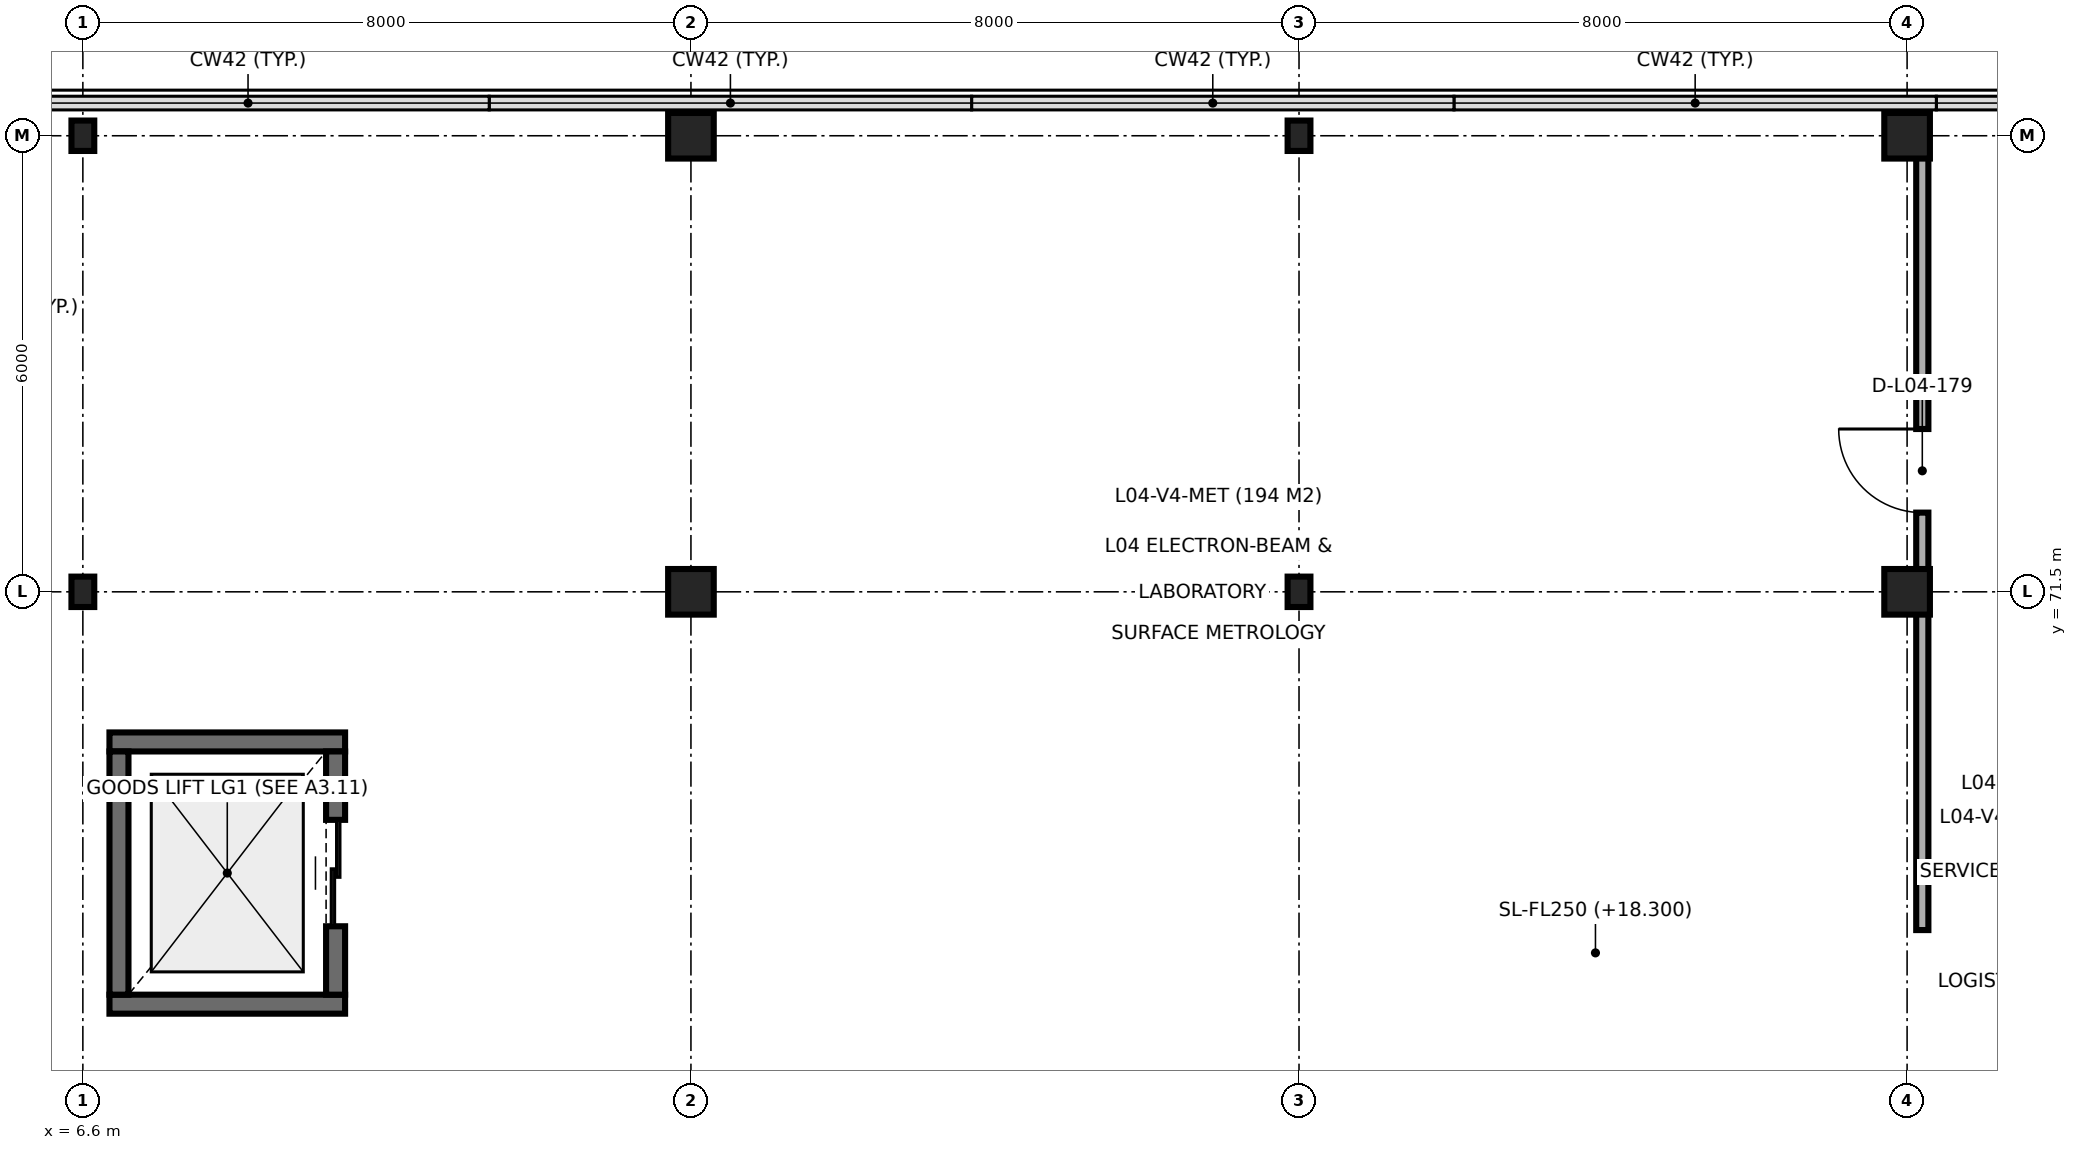
"""IFC4 building model, lengths in metres.
Left out: names, types, materials, properties, quantities, classifications, styles, units other than length and angle.
Written with IfcOpenShell. Run it as: python <this file> out.ifc"""

import sys

from ifc_helpers import new_model, si_unit, direction, frame, frame_2d, origin, origin_2d, place, context, subcontext, project, spatial, rectangle, i_section, extrude, element, fill, save


model = new_model("IFC4")
c1 = context("Model", 3, precision=1e-05, world=origin(), true_north=direction((0.0, 1.0)))
c2 = subcontext(c1, "Body", "Model", "MODEL_VIEW")
j1 = project(units=[si_unit("LENGTHUNIT", "METRE"), si_unit("PLANEANGLEUNIT", "RADIAN")], contexts=[c1])
p1 = place(None, origin())
s1 = spatial("IfcSite", under=j1, at=p1, CompositionType="ELEMENT")
p2 = place(p1, origin())
s2 = spatial("IfcBuilding", under=s1, at=p2, CompositionType="ELEMENT")
p3 = place(p2, frame((0.0, 0.0, 18.3)))
s3 = spatial("IfcBuildingStorey", under=s2, at=p3, CompositionType="ELEMENT", Elevation=18.3)
for number, where, z_axis, x_axis in (
    (1, (6.6, 71.5, 0.0), (0.0, 0.0, 1.0), (1.0, 0.0, 0.0)),
    (2, (6.6, 77.5, 0.0), (0.0, 0.0, 1.0), (1.0, 0.0, 0.0)),
):
    element("IfcColumn", number, at=place(p3, frame(where, z_axis=z_axis, x_axis=x_axis)), inside=s3, PredefinedType="COLUMN", context=c2, shape_type="SweptSolid", body=[
        extrude(i_section(OverallWidth=0.3, OverallDepth=0.4, WebThickness=0.013, FlangeThickness=0.024, FilletRadius=0.027, at=origin_2d()), origin(), (0.0, 0.0, 1.0), 4.5),
    ])
for number, where, z_axis, x_axis in (
    (3, (14.6, 71.5, 0.0), (0.0, 0.0, 1.0), (1.0, 0.0, 0.0)),
    (4, (14.6, 77.5, 0.0), (0.0, 0.0, 1.0), (1.0, 0.0, 0.0)),
):
    element("IfcColumn", number, at=place(p3, frame(where, z_axis=z_axis, x_axis=x_axis)), inside=s3, PredefinedType="COLUMN", context=c2, shape_type="SweptSolid", body=[
        extrude(rectangle(XDim=0.6, YDim=0.6, at=origin_2d()), origin(), (0.0, 0.0, 1.0), 4.5),
    ])
for number, where, z_axis, x_axis in (
    (5, (22.6, 71.5, 0.0), (0.0, 0.0, 1.0), (1.0, 0.0, 0.0)),
    (6, (22.6, 77.5, 0.0), (0.0, 0.0, 1.0), (1.0, 0.0, 0.0)),
):
    element("IfcColumn", number, at=place(p3, frame(where, z_axis=z_axis, x_axis=x_axis)), inside=s3, PredefinedType="COLUMN", context=c2, shape_type="SweptSolid", body=[
        extrude(i_section(OverallWidth=0.3, OverallDepth=0.4, WebThickness=0.013, FlangeThickness=0.024, FilletRadius=0.027, at=origin_2d()), origin(), (0.0, 0.0, 1.0), 4.5),
    ])
for number, where, z_axis, x_axis in (
    (7, (30.6, 71.5, 0.0), (0.0, 0.0, 1.0), (1.0, 0.0, 0.0)),
    (8, (30.6, 77.5, 0.0), (0.0, 0.0, 1.0), (1.0, 0.0, 0.0)),
):
    element("IfcColumn", number, at=place(p3, frame(where, z_axis=z_axis, x_axis=x_axis)), inside=s3, PredefinedType="COLUMN", context=c2, shape_type="SweptSolid", body=[
        extrude(rectangle(XDim=0.6, YDim=0.6, at=origin_2d()), origin(), (0.0, 0.0, 1.0), 4.5),
    ])
for number, where, z_axis, x_axis in (
    (9, (6.95, 66.075, 0.0), (0.0, 0.0, 1.0), (1.0, 0.0, 0.0)),
    (10, (10.05, 69.525, 0.0), (0.0, 0.0, 1.0), (-1.0, 0.0, 0.0)),
):
    element("IfcWall", number, at=place(p3, frame(where, z_axis=z_axis, x_axis=x_axis)), inside=s3, PredefinedType="SHEAR", context=c2, shape_type="SweptSolid", body=[
        extrude(rectangle(XDim=3.1, YDim=0.25, at=frame_2d((1.55, 0.0))), origin(), (0.0, 0.0, 1.0), 4.5),
    ])
p4 = place(p3, frame((7.075, 69.4, 0.0), z_axis=(0.0, 0.0, 1.0), x_axis=(0.0, -1.0, 0.0)))
e11 = element("IfcWall", 11, at=p4, inside=s3, PredefinedType="SHEAR", context=c2, shape_type="SweptSolid", body=[
    extrude(rectangle(XDim=3.2, YDim=0.25, at=frame_2d((1.6, 0.0))), origin(), (0.0, 0.0, 1.0), 4.5),
])
p5 = place(p3, frame((9.925, 66.2, 0.0), z_axis=(0.0, 0.0, 1.0), x_axis=(0.0, 1.0, 0.0)))
e12 = element("IfcWall", 12, at=p5, inside=s3, PredefinedType="SHEAR", context=c2, shape_type="SweptSolid", body=[
    extrude(rectangle(XDim=3.2, YDim=0.25, at=frame_2d((1.6, 0.0))), origin(), (0.0, 0.0, 1.0), 4.5),
])
p6 = place(p5, frame((0.9, 0.0, 0.0)))
e13 = element("IfcOpeningElement", 13, at=p6, cuts=e12, PredefinedType="OPENING", context=c2, shape_type="SweptSolid", body=[
    extrude(rectangle(XDim=1.4, YDim=2.2, at=frame_2d((0.7, 1.1))), frame((0.0, 0.135, 0.0), z_axis=(0.0, -1.0, 0.0), x_axis=(1.0, 0.0, 0.0)), (0.0, 0.0, 1.0), 0.27),
])
p7 = place(p3, frame((30.8, 67.05, 0.0), z_axis=(0.0, 0.0, 1.0), x_axis=(0.0, 1.0, 0.0)))
e14 = element("IfcWall", 14, at=p7, inside=s3, PredefinedType="PARTITIONING", context=c2, shape_type="SweptSolid", body=[
    extrude(rectangle(XDim=4.2, YDim=0.16, at=frame_2d((2.1, 0.0))), origin(), (0.0, 0.0, 1.0), 3.88),
])
p8 = place(p3, frame((30.8, 71.75, 0.0), z_axis=(0.0, 0.0, 1.0), x_axis=(0.0, 1.0, 0.0)))
e15 = element("IfcWall", 15, at=p8, inside=s3, PredefinedType="PARTITIONING", context=c2, shape_type="SweptSolid", body=[
    extrude(rectangle(XDim=5.5, YDim=0.16, at=frame_2d((2.75, 0.0))), origin(), (0.0, 0.0, 1.0), 3.88),
])
p9 = place(p8, frame((0.792, 0.0, 0.0)))
e16 = element("IfcOpeningElement", 16, at=p9, cuts=e15, PredefinedType="OPENING", context=c2, shape_type="SweptSolid", body=[
    extrude(rectangle(XDim=1.1, YDim=2.15, at=frame_2d((0.55, 1.075))), frame((0.0, 0.09, 0.0), z_axis=(0.0, -1.0, 0.0), x_axis=(1.0, 0.0, 0.0)), (0.0, 0.0, 1.0), 0.18),
])
p10 = place(p6, origin())
e17 = element("IfcDoor", 17, at=p10, inside=s3, OperationType="DOUBLE_DOOR_SLIDING", PredefinedType="DOOR", context=c2, shape_type="SweptSolid", body=[
    extrude(rectangle(XDim=1.4, YDim=2.2, at=frame_2d((0.7, 1.1))), frame((0.0, 0.025, 0.0), z_axis=(0.0, -1.0, 0.0), x_axis=(1.0, 0.0, 0.0)), (0.0, 0.0, 1.0), 0.05),
])
fill(e13, e17)
p11 = place(p9, origin())
e18 = element("IfcDoor", 18, at=p11, inside=s3, OperationType="SINGLE_SWING_RIGHT", PredefinedType="DOOR", context=c2, shape_type="SweptSolid", body=[
    extrude(rectangle(XDim=1.1, YDim=2.15, at=frame_2d((0.55, 1.075))), frame((0.0, 0.025, 0.0), z_axis=(0.0, -1.0, 0.0), x_axis=(1.0, 0.0, 0.0)), (0.0, 0.0, 1.0), 0.05),
])
fill(e16, e18)
save(model, sys.argv[1])
